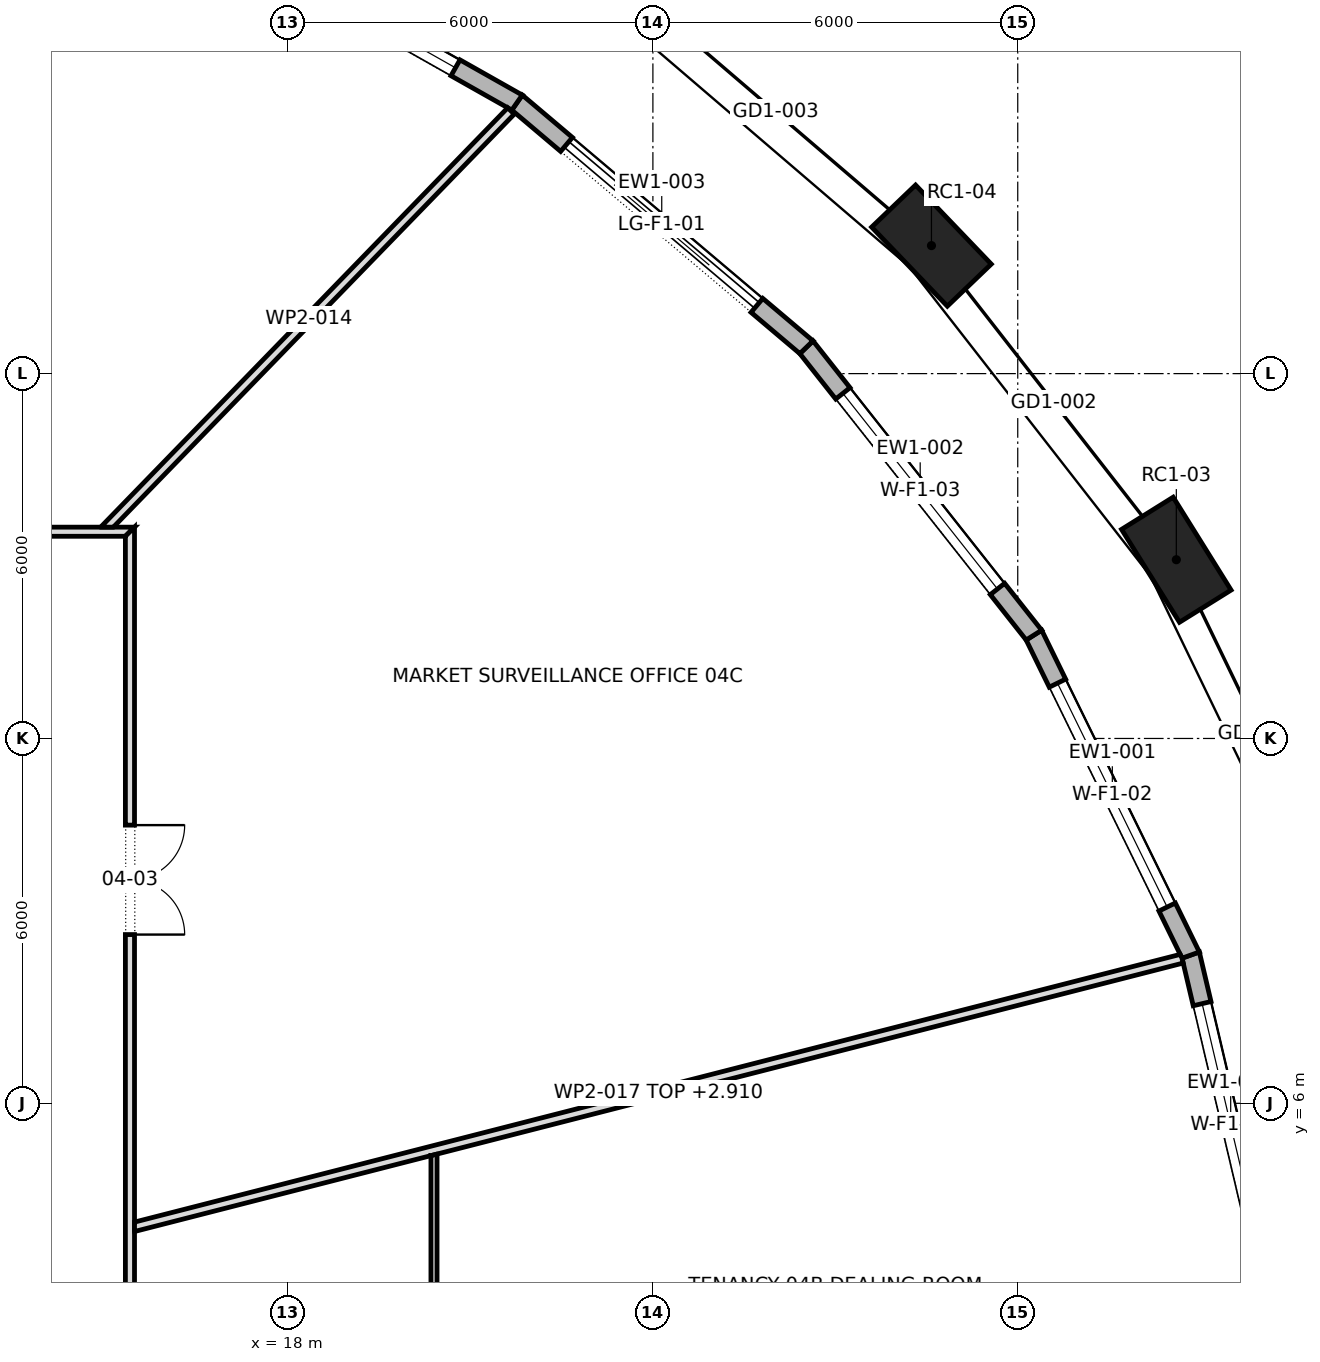
"""IFC4 building model, lengths in metres.
Left out: names, types, materials, properties, quantities, classifications, styles, units other than length and angle.
Written with IfcOpenShell. Run it as: python <this file> out.ifc"""

import sys

from ifc_helpers import new_model, si_unit, direction, frame, frame_2d, origin, origin_2d, place, context, subcontext, project, spatial, polyline, rectangle, outline, extrude, element, fill, save


model = new_model("IFC4")
c1 = context("Model", 3, precision=1e-05, world=origin(), true_north=direction((0.0, 1.0)))
c2 = subcontext(c1, "Body", "Model", "MODEL_VIEW")
j1 = project(units=[si_unit("LENGTHUNIT", "METRE"), si_unit("PLANEANGLEUNIT", "RADIAN")], contexts=[c1])
p1 = place(None, origin())
s1 = spatial("IfcSite", under=j1, at=p1, CompositionType="ELEMENT")
p2 = place(p1, origin())
s2 = spatial("IfcBuilding", under=s1, at=p2, CompositionType="ELEMENT")
p3 = place(p2, frame((0.0, 0.0, 61.3)))
s3 = spatial("IfcBuildingStorey", under=s2, at=p3, CompositionType="ELEMENT", Elevation=61.3)
for number, where, z_axis, x_axis in (
    (1, (32.608, 14.939, 0.0), (0.0, 0.0, 1.0), (-0.529, 0.849, 0.0)),
    (2, (28.581, 20.105, 0.0), (0.0, 0.0, 1.0), (-0.692, 0.722, 0.0)),
):
    element("IfcColumn", number, at=place(p3, frame(where, z_axis=z_axis, x_axis=x_axis)), inside=s3, PredefinedType="COLUMN", context=c2, shape_type="SweptSolid", body=[
        extrude(rectangle(XDim=1.8, YDim=1.0, at=origin_2d()), origin(), (0.0, 0.0, 1.0), 4.2),
    ])
p4 = place(p3, frame((34.159, 2.849, 0.0), z_axis=(0.0, 0.0, 1.0), x_axis=(-0.22905355604, 0.973413821797, 0.0)))
e3 = element("IfcWall", 3, at=p4, inside=s3, PredefinedType="STANDARD", context=c2, shape_type="SweptSolid", body=[
    extrude(outline(polyline([(-0.017, -0.15), (5.758, -0.15), (5.724, 0.15), (0.017, 0.15), (-0.017, -0.15)])), origin(), (0.0, 0.0, 1.0), 3.9),
])
p5 = place(p4, frame((0.82, 0.0, 0.6)))
e4 = element("IfcOpeningElement", 4, at=p5, cuts=e3, PredefinedType="OPENING", context=c2, shape_type="SweptSolid", body=[
    extrude(rectangle(XDim=4.1, YDim=2.85, at=frame_2d((2.05, 1.425))), frame((0.0, 0.162, 0.0), z_axis=(0.0, -1.0, 0.0), x_axis=(1.0, 0.0, 0.0)), (0.0, 0.0, 1.0), 0.324),
])
p6 = place(p3, frame((32.844, 8.438, 0.0), z_axis=(0.0, 0.0, 1.0), x_axis=(-0.439949735177, 0.898022399786, 0.0)))
e5 = element("IfcWall", 5, at=p6, inside=s3, PredefinedType="STANDARD", context=c2, shape_type="SweptSolid", body=[
    extrude(outline(polyline([(-0.017, -0.15), (5.876, -0.15), (5.844, 0.15), (0.017, 0.15), (-0.017, -0.15)])), origin(), (0.0, 0.0, 1.0), 3.9),
])
p7 = place(p6, frame((0.88, 0.0, 0.6)))
e6 = element("IfcOpeningElement", 6, at=p7, cuts=e5, PredefinedType="OPENING", context=c2, shape_type="SweptSolid", body=[
    extrude(rectangle(XDim=4.1, YDim=2.85, at=frame_2d((2.05, 1.425))), frame((0.0, 0.162, 0.0), z_axis=(0.0, -1.0, 0.0), x_axis=(1.0, 0.0, 0.0)), (0.0, 0.0, 1.0), 0.324),
])
p8 = place(p3, frame((30.266, 13.7, 0.0), z_axis=(0.0, 0.0, 1.0), x_axis=(-0.620065339223, 0.784550173727, 0.0)))
e7 = element("IfcWall", 7, at=p8, inside=s3, PredefinedType="STANDARD", context=c2, shape_type="SweptSolid", body=[
    extrude(outline(polyline([(-0.016, -0.15), (6.049, -0.15), (6.019, 0.15), (0.016, 0.15), (-0.016, -0.15)])), origin(), (0.0, 0.0, 1.0), 3.9),
])
p9 = place(p8, frame((0.967, 0.0, 0.6)))
e8 = element("IfcOpeningElement", 8, at=p9, cuts=e7, PredefinedType="OPENING", context=c2, shape_type="SweptSolid", body=[
    extrude(rectangle(XDim=4.1, YDim=2.85, at=frame_2d((2.05, 1.425))), frame((0.0, 0.162, 0.0), z_axis=(0.0, -1.0, 0.0), x_axis=(1.0, 0.0, 0.0)), (0.0, 0.0, 1.0), 0.324),
])
p10 = place(p3, frame((26.525, 18.434, 0.0), z_axis=(0.0, 0.0, 1.0), x_axis=(-0.763655167989, 0.645624336905, 0.0)))
e9 = element("IfcWall", 9, at=p10, inside=s3, PredefinedType="STANDARD", context=c2, shape_type="SweptSolid", body=[
    extrude(outline(polyline([(-0.015, -0.15), (6.246, -0.15), (6.218, 0.15), (0.015, 0.15), (-0.015, -0.15)])), origin(), (0.0, 0.0, 1.0), 3.9),
])
p11 = place(p10, frame((1.066, 0.0, 0.0)))
e10 = element("IfcOpeningElement", 10, at=p11, cuts=e9, PredefinedType="OPENING", context=c2, shape_type="SweptSolid", body=[
    extrude(rectangle(XDim=4.1, YDim=3.45, at=frame_2d((2.05, 1.725))), frame((0.0, 0.162, 0.0), z_axis=(0.0, -1.0, 0.0), x_axis=(1.0, 0.0, 0.0)), (0.0, 0.0, 1.0), 0.324),
])
p12 = place(p3, frame((21.766, 22.457, 0.0), z_axis=(0.0, 0.0, 1.0), x_axis=(-0.870673928577, 0.491860661262, 0.0)))
e11 = element("IfcWall", 11, at=p12, inside=s3, PredefinedType="STANDARD", context=c2, shape_type="SweptSolid", body=[
    extrude(outline(polyline([(-0.014, -0.15), (6.438, -0.15), (6.411, 0.15), (0.014, 0.15), (-0.014, -0.15)])), origin(), (0.0, 0.0, 1.0), 3.9),
])
p13 = place(p12, frame((1.163, 0.0, 0.6)))
e12 = element("IfcOpeningElement", 12, at=p13, cuts=e11, PredefinedType="OPENING", context=c2, shape_type="SweptSolid", body=[
    extrude(rectangle(XDim=4.1, YDim=2.85, at=frame_2d((2.05, 1.425))), frame((0.0, 0.162, 0.0), z_axis=(0.0, -1.0, 0.0), x_axis=(1.0, 0.0, 0.0)), (0.0, 0.0, 1.0), 0.324),
])
p14 = place(p3, frame((-15.475, 15.4, 0.0), z_axis=(0.0, 0.0, 1.0), x_axis=(1.0, 0.0, 0.0)))
e13 = element("IfcWall", 13, at=p14, inside=s3, PredefinedType="PARTITIONING", context=c2, shape_type="SweptSolid", body=[
    extrude(outline(polyline([(0.15, -0.075), (2.066, -0.075), (3.981, -0.075), (5.897, -0.075), (7.812, -0.075), (9.728, -0.075), (11.644, -0.075), (13.56, -0.075), (15.475, -0.075), (17.391, -0.075), (19.306, -0.075), (21.222, -0.075), (23.138, -0.075), (25.053, -0.075), (26.969, -0.075), (28.885, -0.075), (30.8, -0.075), (30.95, 0.075), (29.016, 0.075), (27.081, 0.075), (25.147, 0.075), (23.212, 0.075), (21.278, 0.075), (19.344, 0.075), (17.409, 0.075), (15.475, 0.075), (13.541, 0.075), (11.606, 0.075), (9.672, 0.075), (7.738, 0.075), (5.803, 0.075), (3.869, 0.075), (1.935, 0.075), (0.0, 0.075), (0.15, -0.075)])), origin(), (0.0, 0.0, 1.0), 3.9),
])
p15 = place(p14, frame((22.945, 0.0, 0.0)))
e14 = element("IfcOpeningElement", 14, at=p15, cuts=e13, PredefinedType="OPENING", context=c2, shape_type="SweptSolid", body=[
    extrude(rectangle(XDim=1.8, YDim=2.1, at=frame_2d((0.9, 1.05))), frame((0.0, 0.087, 0.0), z_axis=(0.0, -1.0, 0.0), x_axis=(1.0, 0.0, 0.0)), (0.0, 0.0, 1.0), 0.174),
])
p16 = place(p14, frame((11.0, 0.0, 0.0)))
e15 = element("IfcOpeningElement", 15, at=p16, cuts=e13, PredefinedType="OPENING", context=c2, shape_type="SweptSolid", body=[
    extrude(rectangle(XDim=1.0, YDim=2.1, at=frame_2d((0.5, 1.05))), frame((0.0, 0.087, 0.0), z_axis=(0.0, -1.0, 0.0), x_axis=(1.0, 0.0, 0.0)), (0.0, 0.0, 1.0), 0.174),
])
p17 = place(p3, frame((14.972, 15.423, 0.0), z_axis=(0.0, 0.0, 1.0), x_axis=(0.696498460967, 0.717558286044, 0.0)))
e16 = element("IfcWall", 16, at=p17, inside=s3, PredefinedType="PARTITIONING", context=c2, shape_type="SweptSolid", body=[
    extrude(outline(polyline([(0.0, 0.075), (0.0, 0.074), (0.145, -0.075), (2.038, -0.075), (3.931, -0.075), (5.824, -0.075), (7.717, -0.075), (9.61, -0.075), (9.61, 0.075), (7.688, 0.075), (5.766, 0.075), (3.844, 0.075), (1.922, 0.075), (0.0, 0.075)])), origin(), (0.0, 0.0, 1.0), 3.9),
])
p18 = place(p3, frame((15.4, -15.475, 0.0), z_axis=(0.0, 0.0, 1.0), x_axis=(0.0, 1.0, 0.0)))
e17 = element("IfcWall", 17, at=p18, inside=s3, PredefinedType="PARTITIONING", context=c2, shape_type="SweptSolid", body=[
    extrude(outline(polyline([(0.0, -0.075), (1.935, -0.075), (3.869, -0.075), (5.803, -0.075), (7.738, -0.075), (9.672, -0.075), (11.606, -0.075), (13.541, -0.075), (15.475, -0.075), (17.409, -0.075), (19.344, -0.075), (21.278, -0.075), (23.212, -0.075), (25.147, -0.075), (27.081, -0.075), (29.016, -0.075), (30.95, -0.075), (30.8, 0.075), (28.885, 0.075), (26.969, 0.075), (25.053, 0.075), (23.138, 0.075), (21.222, 0.075), (19.306, 0.075), (17.391, 0.075), (15.475, 0.075), (13.56, 0.075), (11.644, 0.075), (9.728, 0.075), (7.812, 0.075), (5.897, 0.075), (3.981, 0.075), (2.066, 0.075), (0.15, 0.075), (0.0, -0.075)])), origin(), (0.0, 0.0, 1.0), 3.9),
])
p19 = place(p18, frame((4.9, 0.0, 0.0)))
e18 = element("IfcOpeningElement", 18, at=p19, cuts=e17, PredefinedType="OPENING", context=c2, shape_type="SweptSolid", body=[
    extrude(rectangle(XDim=1.8, YDim=2.1, at=frame_2d((0.9, 1.05))), frame((0.0, 0.087, 0.0), z_axis=(0.0, -1.0, 0.0), x_axis=(1.0, 0.0, 0.0)), (0.0, 0.0, 1.0), 0.174),
])
p20 = place(p18, frame((14.975, 0.0, 0.0)))
e19 = element("IfcOpeningElement", 19, at=p20, cuts=e17, PredefinedType="OPENING", context=c2, shape_type="SweptSolid", body=[
    extrude(rectangle(XDim=1.0, YDim=2.1, at=frame_2d((0.5, 1.05))), frame((0.0, 0.087, 0.0), z_axis=(0.0, -1.0, 0.0), x_axis=(1.0, 0.0, 0.0)), (0.0, 0.0, 1.0), 0.174),
])
p21 = place(p18, frame((24.25, 0.0, 0.0)))
e20 = element("IfcOpeningElement", 20, at=p21, cuts=e17, PredefinedType="OPENING", context=c2, shape_type="SweptSolid", body=[
    extrude(rectangle(XDim=1.8, YDim=2.1, at=frame_2d((0.9, 1.05))), frame((0.0, 0.087, 0.0), z_axis=(0.0, -1.0, 0.0), x_axis=(1.0, 0.0, 0.0)), (0.0, 0.0, 1.0), 0.174),
])
p22 = place(p3, frame((15.457, 3.965, 0.0), z_axis=(0.0, 0.0, 1.0), x_axis=(0.968758808885, 0.248004778598, 0.0)))
e21 = element("IfcWall", 21, at=p22, inside=s3, PredefinedType="PARTITIONING", context=c2, shape_type="SweptSolid", body=[
    extrude(outline(polyline([(0.0, -0.075), (1.677, -0.075), (3.354, -0.075), (5.032, -0.075), (5.032, -0.075), (5.032, -0.075), (6.856, -0.075), (8.68, -0.075), (10.505, -0.075), (12.329, -0.075), (14.153, -0.075), (15.977, -0.075), (17.801, -0.075), (17.801, 0.017), (17.789, 0.075), (15.817, 0.075), (13.844, 0.075), (11.872, 0.075), (9.9, 0.075), (7.927, 0.075), (5.955, 0.075), (3.983, 0.075), (2.01, 0.075), (0.038, 0.075), (0.0, -0.073), (0.0, -0.075)])), origin(), (0.0, 0.0, 1.0), 2.91),
])
p23 = place(p3, frame((20.4, 5.165, 0.0), z_axis=(0.0, 0.0, 1.0), x_axis=(0.0, -1.0, 0.0)))
e22 = element("IfcWall", 22, at=p23, inside=s3, PredefinedType="PARTITIONING", context=c2, shape_type="SweptSolid", body=[
    extrude(outline(polyline([(0.025, -0.05), (1.739, -0.05), (3.452, -0.05), (5.166, -0.05), (6.879, -0.05), (8.593, -0.05), (10.306, -0.05), (10.332, 0.05), (10.332, 0.05), (8.61, 0.05), (6.888, 0.05), (5.166, 0.05), (3.444, 0.05), (1.722, 0.05), (0.0, 0.05), (0.0, 0.049), (0.025, -0.05)])), origin(), (0.0, 0.0, 1.0), 3.9),
])
p24 = place(p23, frame((4.715, 0.0, 0.0)))
e23 = element("IfcOpeningElement", 23, at=p24, cuts=e22, PredefinedType="OPENING", context=c2, shape_type="SweptSolid", body=[
    extrude(rectangle(XDim=0.9, YDim=2.1, at=frame_2d((0.45, 1.05))), frame((0.0, 0.062, 0.0), z_axis=(0.0, -1.0, 0.0), x_axis=(1.0, 0.0, 0.0)), (0.0, 0.0, 1.0), 0.124),
])
p25 = place(p5, origin())
e24 = element("IfcWindow", 24, at=p25, inside=s3, PartitioningType="TRIPLE_PANEL_VERTICAL", PredefinedType="WINDOW", context=c2, shape_type="SweptSolid", body=[
    extrude(rectangle(XDim=4.1, YDim=2.85, at=frame_2d((2.05, 1.425))), frame((0.0, 0.03, 0.0), z_axis=(0.0, -1.0, 0.0), x_axis=(1.0, 0.0, 0.0)), (0.0, 0.0, 1.0), 0.06),
])
fill(e4, e24)
p26 = place(p7, origin())
e25 = element("IfcWindow", 25, at=p26, inside=s3, PartitioningType="TRIPLE_PANEL_VERTICAL", PredefinedType="WINDOW", context=c2, shape_type="SweptSolid", body=[
    extrude(rectangle(XDim=4.1, YDim=2.85, at=frame_2d((2.05, 1.425))), frame((0.0, 0.03, 0.0), z_axis=(0.0, -1.0, 0.0), x_axis=(1.0, 0.0, 0.0)), (0.0, 0.0, 1.0), 0.06),
])
fill(e6, e25)
p27 = place(p9, origin())
e26 = element("IfcWindow", 26, at=p27, inside=s3, PartitioningType="TRIPLE_PANEL_VERTICAL", PredefinedType="WINDOW", context=c2, shape_type="SweptSolid", body=[
    extrude(rectangle(XDim=4.1, YDim=2.85, at=frame_2d((2.05, 1.425))), frame((0.0, 0.03, 0.0), z_axis=(0.0, -1.0, 0.0), x_axis=(1.0, 0.0, 0.0)), (0.0, 0.0, 1.0), 0.06),
])
fill(e8, e26)
p28 = place(p11, origin())
e27 = element("IfcDoor", 27, at=p28, inside=s3, OperationType="DOUBLE_DOOR_SLIDING", PredefinedType="DOOR", context=c2, shape_type="SweptSolid", body=[
    extrude(rectangle(XDim=4.1, YDim=3.45, at=frame_2d((2.05, 1.725))), frame((0.0, 0.025, 0.0), z_axis=(0.0, -1.0, 0.0), x_axis=(1.0, 0.0, 0.0)), (0.0, 0.0, 1.0), 0.05),
])
fill(e10, e27)
p29 = place(p13, origin())
e28 = element("IfcWindow", 28, at=p29, inside=s3, PartitioningType="TRIPLE_PANEL_VERTICAL", PredefinedType="WINDOW", context=c2, shape_type="SweptSolid", body=[
    extrude(rectangle(XDim=4.1, YDim=2.85, at=frame_2d((2.05, 1.425))), frame((0.0, 0.03, 0.0), z_axis=(0.0, -1.0, 0.0), x_axis=(1.0, 0.0, 0.0)), (0.0, 0.0, 1.0), 0.06),
])
fill(e12, e28)
p30 = place(p21, frame((1.8, 0.0, 0.0), z_axis=(0.0, 0.0, 1.0), x_axis=(-1.0, 0.0, 0.0)))
e29 = element("IfcDoor", 29, at=p30, inside=s3, OperationType="DOUBLE_DOOR_SINGLE_SWING", PredefinedType="DOOR", context=c2, shape_type="SweptSolid", body=[
    extrude(rectangle(XDim=1.8, YDim=2.1, at=frame_2d((0.9, 1.05))), frame((0.0, 0.025, 0.0), z_axis=(0.0, -1.0, 0.0), x_axis=(1.0, 0.0, 0.0)), (0.0, 0.0, 1.0), 0.05),
])
fill(e20, e29)
save(model, sys.argv[1])
